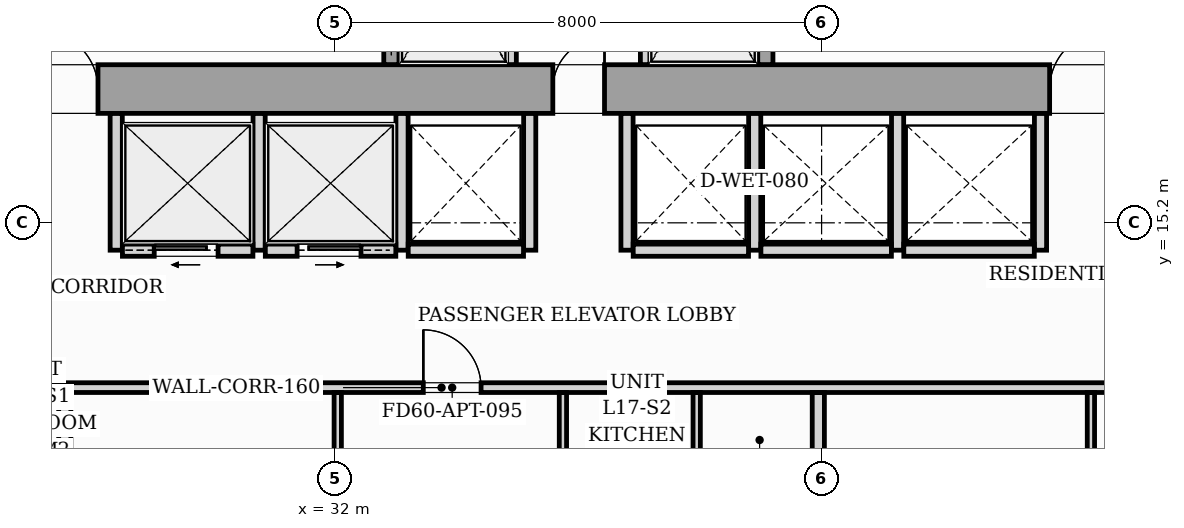
"""IFC4 building model, lengths in metres.
Left out: names, types, materials, properties, quantities, classifications, styles, units other than length and angle.
Written with IfcOpenShell. Run it as: python <this file> out.ifc"""

import sys

from ifc_helpers import new_model, si_unit, direction, frame, frame_2d, origin, origin_2d, place, context, subcontext, project, spatial, rectangle, i_section, extrude, source, transform, mapped, element, fill, save


model = new_model("IFC4")
c1 = context("Model", 3, precision=1e-05, world=origin(), true_north=direction((0.0, 1.0)))
c2 = subcontext(c1, "Body", "Model", "MODEL_VIEW")
j1 = project(units=[si_unit("LENGTHUNIT", "METRE"), si_unit("PLANEANGLEUNIT", "RADIAN")], contexts=[c1])
p1 = place(None, origin())
s1 = spatial("IfcSite", under=j1, at=p1, CompositionType="ELEMENT")
p2 = place(p1, origin())
s2 = spatial("IfcBuilding", under=s1, at=p2, CompositionType="ELEMENT")
p3 = place(p2, frame((0.0, 0.0, 61.4)))
s3 = spatial("IfcBuildingStorey", under=s2, at=p3, CompositionType="ELEMENT", Elevation=61.4)
m1 = source(origin(), c2, "Body", "SweptSolid", [
    extrude(i_section(OverallWidth=0.437, OverallDepth=0.514, WebThickness=0.061, FlangeThickness=0.097, FilletRadius=0.018, at=origin_2d()), origin(), (0.0, 0.0, 1.0), 3.196),
])
for number, where, z_axis, x_axis in (
    (1, (33.12, 17.4, 0.002), (0.0, 0.0, 1.0), (1.0, 0.0, 0.0)),
    (2, (38.88, 17.4, 0.002), (0.0, 0.0, 1.0), (1.0, 0.0, 0.0)),
):
    element("IfcColumn", number, at=place(p3, frame(where, z_axis=z_axis, x_axis=x_axis)), inside=s3, PredefinedType="PILASTER", context=c2, shape_type="MappedRepresentation", body=[
        mapped(m1, transform((0.0, 0.0, 0.0), scale=1.0)),
    ])
p4 = place(p3, frame((26.0, 17.4, 0.0), z_axis=(0.0, 0.0, 1.0), x_axis=(1.0, 0.0, 0.0)))
e3 = element("IfcWall", 3, at=p4, inside=s3, PredefinedType="SHEAR", context=c2, shape_type="SweptSolid", body=[
    extrude(rectangle(XDim=20.0, YDim=0.8, at=frame_2d((10.0, 0.0))), origin(), (0.0, 0.0, 1.0), 3.2),
])
p5 = place(p4, frame((1.15, 0.0, 0.0)))
e4 = element("IfcOpeningElement", 4, at=p5, cuts=e3, PredefinedType="OPENING", context=c2, shape_type="SweptSolid", body=[
    extrude(rectangle(XDim=0.95, YDim=2.06, at=frame_2d((0.475, 1.03))), frame((0.0, 0.41, 0.0), z_axis=(0.0, -1.0, 0.0), x_axis=(1.0, 0.0, 0.0)), (0.0, 0.0, 1.0), 0.82),
])
p6 = place(p4, frame((9.58, 0.0, 0.0)))
e5 = element("IfcOpeningElement", 5, at=p6, cuts=e3, PredefinedType="OPENING", context=c2, shape_type="SweptSolid", body=[
    extrude(rectangle(XDim=0.85, YDim=2.0, at=frame_2d((0.425, 1.0))), frame((0.0, 0.41, 0.0), z_axis=(0.0, -1.0, 0.0), x_axis=(1.0, 0.0, 0.0)), (0.0, 0.0, 1.0), 0.82),
])
p7 = place(p4, frame((17.75, 0.0, 0.0)))
e6 = element("IfcOpeningElement", 6, at=p7, cuts=e3, PredefinedType="OPENING", context=c2, shape_type="SweptSolid", body=[
    extrude(rectangle(XDim=0.95, YDim=2.06, at=frame_2d((0.475, 1.03))), frame((0.0, 0.41, 0.0), z_axis=(0.0, -1.0, 0.0), x_axis=(1.0, 0.0, 0.0)), (0.0, 0.0, 1.0), 0.82),
])
p8 = place(p3, frame((32.925, 17.802, 0.0), z_axis=(0.0, 0.0, 1.0), x_axis=(0.0, 1.0, 0.0)))
e7 = element("IfcWall", 7, at=p8, inside=s3, PredefinedType="SOLIDWALL", context=c2, shape_type="SweptSolid", body=[
    extrude(rectangle(XDim=2.646, YDim=0.25, at=frame_2d((1.323, 0.0))), origin(), (0.0, 0.0, 1.0), 3.2),
])
p9 = place(p8, frame((0.648, 0.0, 0.0)))
e8 = element("IfcOpeningElement", 8, at=p9, cuts=e7, PredefinedType="OPENING", context=c2, shape_type="SweptSolid", body=[
    extrude(rectangle(XDim=1.1, YDim=2.08, at=frame_2d((0.55, 1.04))), frame((0.0, 0.135, 0.0), z_axis=(0.0, -1.0, 0.0), x_axis=(1.0, 0.0, 0.0)), (0.0, 0.0, 1.0), 0.27),
])
for number, where, z_axis, x_axis in (
    (9, (34.9, 17.802, 0.0), (0.0, 0.0, 1.0), (0.0, 1.0, 0.0)),
    (10, (37.1, 17.802, 0.0), (0.0, 0.0, 1.0), (0.0, 1.0, 0.0)),
):
    element("IfcWall", number, at=place(p3, frame(where, z_axis=z_axis, x_axis=x_axis)), inside=s3, PredefinedType="PARTITIONING", context=c2, shape_type="SweptSolid", body=[
        extrude(rectangle(XDim=2.646, YDim=0.16, at=frame_2d((1.323, 0.0))), origin(), (0.0, 0.0, 1.0), 2.94),
    ])
p10 = place(p3, frame((39.075, 17.802, 0.0), z_axis=(0.0, 0.0, 1.0), x_axis=(0.0, 1.0, 0.0)))
e11 = element("IfcWall", 11, at=p10, inside=s3, PredefinedType="SOLIDWALL", context=c2, shape_type="SweptSolid", body=[
    extrude(rectangle(XDim=2.646, YDim=0.25, at=frame_2d((1.323, 0.0))), origin(), (0.0, 0.0, 1.0), 3.2),
])
p11 = place(p10, frame((0.648, 0.0, 0.0)))
e12 = element("IfcOpeningElement", 12, at=p11, cuts=e11, PredefinedType="OPENING", context=c2, shape_type="SweptSolid", body=[
    extrude(rectangle(XDim=1.1, YDim=2.08, at=frame_2d((0.55, 1.04))), frame((0.0, 0.135, 0.0), z_axis=(0.0, -1.0, 0.0), x_axis=(1.0, 0.0, 0.0)), (0.0, 0.0, 1.0), 0.27),
])
for number, where, z_axis, x_axis in (
    (13, (28.4, 14.75, 0.0), (0.0, 0.0, 1.0), (0.0, 1.0, 0.0)),
    (14, (30.75, 14.75, 0.0), (0.0, 0.0, 1.0), (0.0, 1.0, 0.0)),
    (15, (33.1, 14.75, 0.0), (0.0, 0.0, 1.0), (0.0, 1.0, 0.0)),
):
    element("IfcWall", number, at=place(p3, frame(where, z_axis=z_axis, x_axis=x_axis)), inside=s3, PredefinedType="PARTITIONING", context=c2, shape_type="SweptSolid", body=[
        extrude(rectangle(XDim=2.248, YDim=0.2, at=frame_2d((1.124, 0.0))), origin(), (0.0, 0.0, 1.0), 2.94),
    ])
p12 = place(p3, frame((28.502, 14.75, 0.0), z_axis=(0.0, 0.0, 1.0), x_axis=(1.0, 0.0, 0.0)))
e16 = element("IfcWall", 16, at=p12, inside=s3, PredefinedType="PARTITIONING", context=c2, shape_type="SweptSolid", body=[
    extrude(rectangle(XDim=2.146, YDim=0.2, at=frame_2d((1.073, 0.0))), origin(), (0.0, 0.0, 1.0), 2.94),
])
p13 = place(p12, frame((0.523, 0.0, 0.0)))
e17 = element("IfcOpeningElement", 17, at=p13, cuts=e16, PredefinedType="OPENING", context=c2, shape_type="SweptSolid", body=[
    extrude(rectangle(XDim=1.05, YDim=2.08, at=frame_2d((0.525, 1.04))), frame((0.0, 0.11, 0.0), z_axis=(0.0, -1.0, 0.0), x_axis=(1.0, 0.0, 0.0)), (0.0, 0.0, 1.0), 0.22),
])
p14 = place(p3, frame((30.852, 14.75, 0.0), z_axis=(0.0, 0.0, 1.0), x_axis=(1.0, 0.0, 0.0)))
e18 = element("IfcWall", 18, at=p14, inside=s3, PredefinedType="PARTITIONING", context=c2, shape_type="SweptSolid", body=[
    extrude(rectangle(XDim=2.146, YDim=0.2, at=frame_2d((1.073, 0.0))), origin(), (0.0, 0.0, 1.0), 2.94),
])
p15 = place(p14, frame((0.523, 0.0, 0.0)))
e19 = element("IfcOpeningElement", 19, at=p15, cuts=e18, PredefinedType="OPENING", context=c2, shape_type="SweptSolid", body=[
    extrude(rectangle(XDim=1.05, YDim=2.08, at=frame_2d((0.525, 1.04))), frame((0.0, 0.11, 0.0), z_axis=(0.0, -1.0, 0.0), x_axis=(1.0, 0.0, 0.0)), (0.0, 0.0, 1.0), 0.22),
])
p16 = place(p3, frame((35.2, 14.75, 0.0), z_axis=(0.0, 0.0, 1.0), x_axis=(0.0, 1.0, 0.0)))
e20 = element("IfcWall", 20, at=p16, inside=s3, PredefinedType="PARTITIONING", context=c2, shape_type="SweptSolid", body=[
    extrude(rectangle(XDim=2.248, YDim=0.2, at=frame_2d((1.124, 0.0))), origin(), (0.0, 0.0, 1.0), 2.94),
])
p17 = place(p3, frame((33.202, 14.75, 0.0), z_axis=(0.0, 0.0, 1.0), x_axis=(1.0, 0.0, 0.0)))
e21 = element("IfcWall", 21, at=p17, inside=s3, PredefinedType="PARTITIONING", context=c2, shape_type="SweptSolid", body=[
    extrude(rectangle(XDim=1.896, YDim=0.2, at=frame_2d((0.948, 0.0))), origin(), (0.0, 0.0, 1.0), 2.94),
])
for number, where, z_axis, x_axis in (
    (22, (36.8, 14.75, 0.0), (0.0, 0.0, 1.0), (0.0, 1.0, 0.0)),
    (23, (38.9, 14.75, 0.0), (0.0, 0.0, 1.0), (0.0, 1.0, 0.0)),
):
    element("IfcWall", number, at=place(p3, frame(where, z_axis=z_axis, x_axis=x_axis)), inside=s3, PredefinedType="PARTITIONING", context=c2, shape_type="SweptSolid", body=[
        extrude(rectangle(XDim=2.248, YDim=0.2, at=frame_2d((1.124, 0.0))), origin(), (0.0, 0.0, 1.0), 2.94),
    ])
p18 = place(p3, frame((36.902, 14.75, 0.0), z_axis=(0.0, 0.0, 1.0), x_axis=(1.0, 0.0, 0.0)))
e24 = element("IfcWall", 24, at=p18, inside=s3, PredefinedType="PARTITIONING", context=c2, shape_type="SweptSolid", body=[
    extrude(rectangle(XDim=1.896, YDim=0.2, at=frame_2d((0.948, 0.0))), origin(), (0.0, 0.0, 1.0), 2.94),
])
for number, where, z_axis, x_axis in (
    (25, (41.25, 14.75, 0.0), (0.0, 0.0, 1.0), (0.0, 1.0, 0.0)),
    (26, (43.6, 14.75, 0.0), (0.0, 0.0, 1.0), (0.0, 1.0, 0.0)),
):
    element("IfcWall", number, at=place(p3, frame(where, z_axis=z_axis, x_axis=x_axis)), inside=s3, PredefinedType="PARTITIONING", context=c2, shape_type="SweptSolid", body=[
        extrude(rectangle(XDim=2.248, YDim=0.2, at=frame_2d((1.124, 0.0))), origin(), (0.0, 0.0, 1.0), 2.94),
    ])
for number, where, z_axis, x_axis in (
    (27, (39.002, 14.75, 0.0), (0.0, 0.0, 1.0), (1.0, 0.0, 0.0)),
    (28, (41.352, 14.75, 0.0), (0.0, 0.0, 1.0), (1.0, 0.0, 0.0)),
):
    element("IfcWall", number, at=place(p3, frame(where, z_axis=z_axis, x_axis=x_axis)), inside=s3, PredefinedType="PARTITIONING", context=c2, shape_type="SweptSolid", body=[
        extrude(rectangle(XDim=2.146, YDim=0.2, at=frame_2d((1.073, 0.0))), origin(), (0.0, 0.0, 1.0), 2.94),
    ])
p19 = place(p3, frame((15.2, 12.49, 0.0), z_axis=(0.0, 0.0, 1.0), x_axis=(1.0, 0.0, 0.0)))
e29 = element("IfcWall", 29, at=p19, inside=s3, PredefinedType="PARTITIONING", context=c2, shape_type="SweptSolid", body=[
    extrude(rectangle(XDim=37.1, YDim=0.16, at=frame_2d((18.55, 0.0))), origin(), (0.0, 0.0, 1.0), 2.94),
])
p20 = place(p19, frame((5.863, 0.0, 0.0)))
e30 = element("IfcOpeningElement", 30, at=p20, cuts=e29, PredefinedType="OPENING", context=c2, shape_type="SweptSolid", body=[
    extrude(rectangle(XDim=0.95, YDim=2.06, at=frame_2d((0.475, 1.03))), frame((0.0, 0.09, 0.0), z_axis=(0.0, -1.0, 0.0), x_axis=(1.0, 0.0, 0.0)), (0.0, 0.0, 1.0), 0.18),
])
p21 = place(p19, frame((18.25, 0.0, 0.0)))
e31 = element("IfcOpeningElement", 31, at=p21, cuts=e29, PredefinedType="OPENING", context=c2, shape_type="SweptSolid", body=[
    extrude(rectangle(XDim=0.95, YDim=2.06, at=frame_2d((0.475, 1.03))), frame((0.0, 0.09, 0.0), z_axis=(0.0, -1.0, 0.0), x_axis=(1.0, 0.0, 0.0)), (0.0, 0.0, 1.0), 0.18),
])
p22 = place(p19, frame((30.63, 0.0, 0.0)))
e32 = element("IfcOpeningElement", 32, at=p22, cuts=e29, PredefinedType="OPENING", context=c2, shape_type="SweptSolid", body=[
    extrude(rectangle(XDim=0.95, YDim=2.06, at=frame_2d((0.475, 1.03))), frame((0.0, 0.09, 0.0), z_axis=(0.0, -1.0, 0.0), x_axis=(1.0, 0.0, 0.0)), (0.0, 0.0, 1.0), 0.18),
])
p23 = place(p3, frame((27.554, 10.302, 0.0), z_axis=(0.0, 0.0, 1.0), x_axis=(0.0, 1.0, 0.0)))
e33 = element("IfcWall", 33, at=p23, inside=s3, PredefinedType="PARTITIONING", context=c2, shape_type="SweptSolid", body=[
    extrude(rectangle(XDim=2.106, YDim=0.2, at=frame_2d((1.053, 0.0))), origin(), (0.0, 0.0, 1.0), 2.94),
])
for number, where, z_axis, x_axis in (
    (34, (35.746, 10.302, 0.0), (0.0, 0.0, 1.0), (0.0, 1.0, 0.0)),
    (35, (37.946, 10.302, 0.0), (0.0, 0.0, 1.0), (0.0, 1.0, 0.0)),
):
    element("IfcWall", number, at=place(p3, frame(where, z_axis=z_axis, x_axis=x_axis)), inside=s3, PredefinedType="PARTITIONING", context=c2, shape_type="SweptSolid", body=[
        extrude(rectangle(XDim=2.106, YDim=0.12, at=frame_2d((1.053, 0.0))), origin(), (0.0, 0.0, 1.0), 2.94),
    ])
p24 = place(p3, frame((32.043, 2.78, 0.0), z_axis=(0.0, 0.0, 1.0), x_axis=(0.0, 1.0, 0.0)))
e36 = element("IfcWall", 36, at=p24, inside=s3, PredefinedType="PARTITIONING", context=c2, shape_type="SweptSolid", body=[
    extrude(rectangle(XDim=9.628, YDim=0.12, at=frame_2d((4.814, 0.0))), origin(), (0.0, 0.0, 1.0), 2.94),
])
p25 = place(p24, frame((4.47, 0.0, 0.0)))
e37 = element("IfcOpeningElement", 37, at=p25, cuts=e36, PredefinedType="OPENING", context=c2, shape_type="SweptSolid", body=[
    extrude(rectangle(XDim=0.85, YDim=2.05, at=frame_2d((0.425, 1.025))), frame((0.0, 0.07, 0.0), z_axis=(0.0, -1.0, 0.0), x_axis=(1.0, 0.0, 0.0)), (0.0, 0.0, 1.0), 0.14),
])
p26 = place(p3, frame((39.946, 10.302, 0.0), z_axis=(0.0, 0.0, 1.0), x_axis=(0.0, 1.0, 0.0)))
e38 = element("IfcWall", 38, at=p26, inside=s3, PredefinedType="PARTITIONING", context=c2, shape_type="SweptSolid", body=[
    extrude(rectangle(XDim=2.106, YDim=0.2, at=frame_2d((1.053, 0.0))), origin(), (0.0, 0.0, 1.0), 2.94),
])
p27 = place(p3, frame((44.429, 2.962, 0.0), z_axis=(0.0, 0.0, 1.0), x_axis=(0.0, 1.0, 0.0)))
e39 = element("IfcWall", 39, at=p27, inside=s3, PredefinedType="PARTITIONING", context=c2, shape_type="SweptSolid", body=[
    extrude(rectangle(XDim=9.446, YDim=0.12, at=frame_2d((4.723, 0.0))), origin(), (0.0, 0.0, 1.0), 2.136),
])
p28 = place(p27, frame((4.288, 0.0, 0.0)))
e40 = element("IfcOpeningElement", 40, at=p28, cuts=e39, PredefinedType="OPENING", context=c2, shape_type="SweptSolid", body=[
    extrude(rectangle(XDim=0.85, YDim=2.01, at=frame_2d((0.425, 1.005))), frame((0.0, 0.07, 0.0), z_axis=(0.0, -1.0, 0.0), x_axis=(1.0, 0.0, 0.0)), (0.0, 0.0, 1.0), 0.14),
])
m2 = source(origin(), c2, "Body", "SweptSolid", [
    extrude(rectangle(XDim=0.95, YDim=2.06, at=frame_2d((0.475, 1.03))), frame((0.0, 0.025, 0.0), z_axis=(0.0, -1.0, 0.0), x_axis=(1.0, 0.0, 0.0)), (0.0, 0.0, 1.0), 0.05),
])
p29 = place(p5, origin())
e41 = element("IfcDoor", 41, at=p29, inside=s3, OperationType="SINGLE_SWING_LEFT", PredefinedType="DOOR", context=c2, shape_type="MappedRepresentation", body=[
    mapped(m2, transform((0.0, 0.0, 0.0), scale=1.0)),
])
fill(e4, e41)
m3 = source(origin(), c2, "Body", "SweptSolid", [
    extrude(rectangle(XDim=0.85, YDim=2.0, at=frame_2d((0.425, 1.0))), frame((0.0, 0.025, 0.0), z_axis=(0.0, -1.0, 0.0), x_axis=(1.0, 0.0, 0.0)), (0.0, 0.0, 1.0), 0.05),
])
p30 = place(p6, origin())
e42 = element("IfcDoor", 42, at=p30, inside=s3, OperationType="SINGLE_SWING_RIGHT", PredefinedType="DOOR", context=c2, shape_type="MappedRepresentation", body=[
    mapped(m3, transform((0.0, 0.0, 0.0), scale=1.0)),
])
fill(e5, e42)
p31 = place(p7, origin())
e43 = element("IfcDoor", 43, at=p31, inside=s3, OperationType="SINGLE_SWING_RIGHT", PredefinedType="DOOR", context=c2, shape_type="MappedRepresentation", body=[
    mapped(m2, transform((0.0, 0.0, 0.0), scale=1.0)),
])
fill(e6, e43)
m4 = source(origin(), c2, "Body", "SweptSolid", [
    extrude(rectangle(XDim=1.05, YDim=2.08, at=frame_2d((0.525, 1.04))), frame((0.0, 0.025, 0.0), z_axis=(0.0, -1.0, 0.0), x_axis=(1.0, 0.0, 0.0)), (0.0, 0.0, 1.0), 0.05),
])
p32 = place(p13, origin())
e44 = element("IfcDoor", 44, at=p32, inside=s3, OperationType="SLIDING_TO_LEFT", PredefinedType="DOOR", context=c2, shape_type="MappedRepresentation", body=[
    mapped(m4, transform((0.0, 0.0, 0.0), scale=1.0)),
])
fill(e17, e44)
p33 = place(p15, origin())
e45 = element("IfcDoor", 45, at=p33, inside=s3, OperationType="SLIDING_TO_RIGHT", PredefinedType="DOOR", context=c2, shape_type="MappedRepresentation", body=[
    mapped(m4, transform((0.0, 0.0, 0.0), scale=1.0)),
])
fill(e19, e45)
m5 = source(origin(), c2, "Body", "SweptSolid", [
    extrude(rectangle(XDim=0.95, YDim=2.06, at=frame_2d((0.475, 1.03))), frame((0.0, 0.025, 0.0), z_axis=(0.0, -1.0, 0.0), x_axis=(1.0, 0.0, 0.0)), (0.0, 0.0, 1.0), 0.05),
])
p34 = place(p21, origin())
e46 = element("IfcDoor", 46, at=p34, inside=s3, OperationType="SINGLE_SWING_LEFT", PredefinedType="DOOR", context=c2, shape_type="MappedRepresentation", body=[
    mapped(m5, transform((0.0, 0.0, 0.0), scale=1.0)),
])
fill(e31, e46)
save(model, sys.argv[1])
